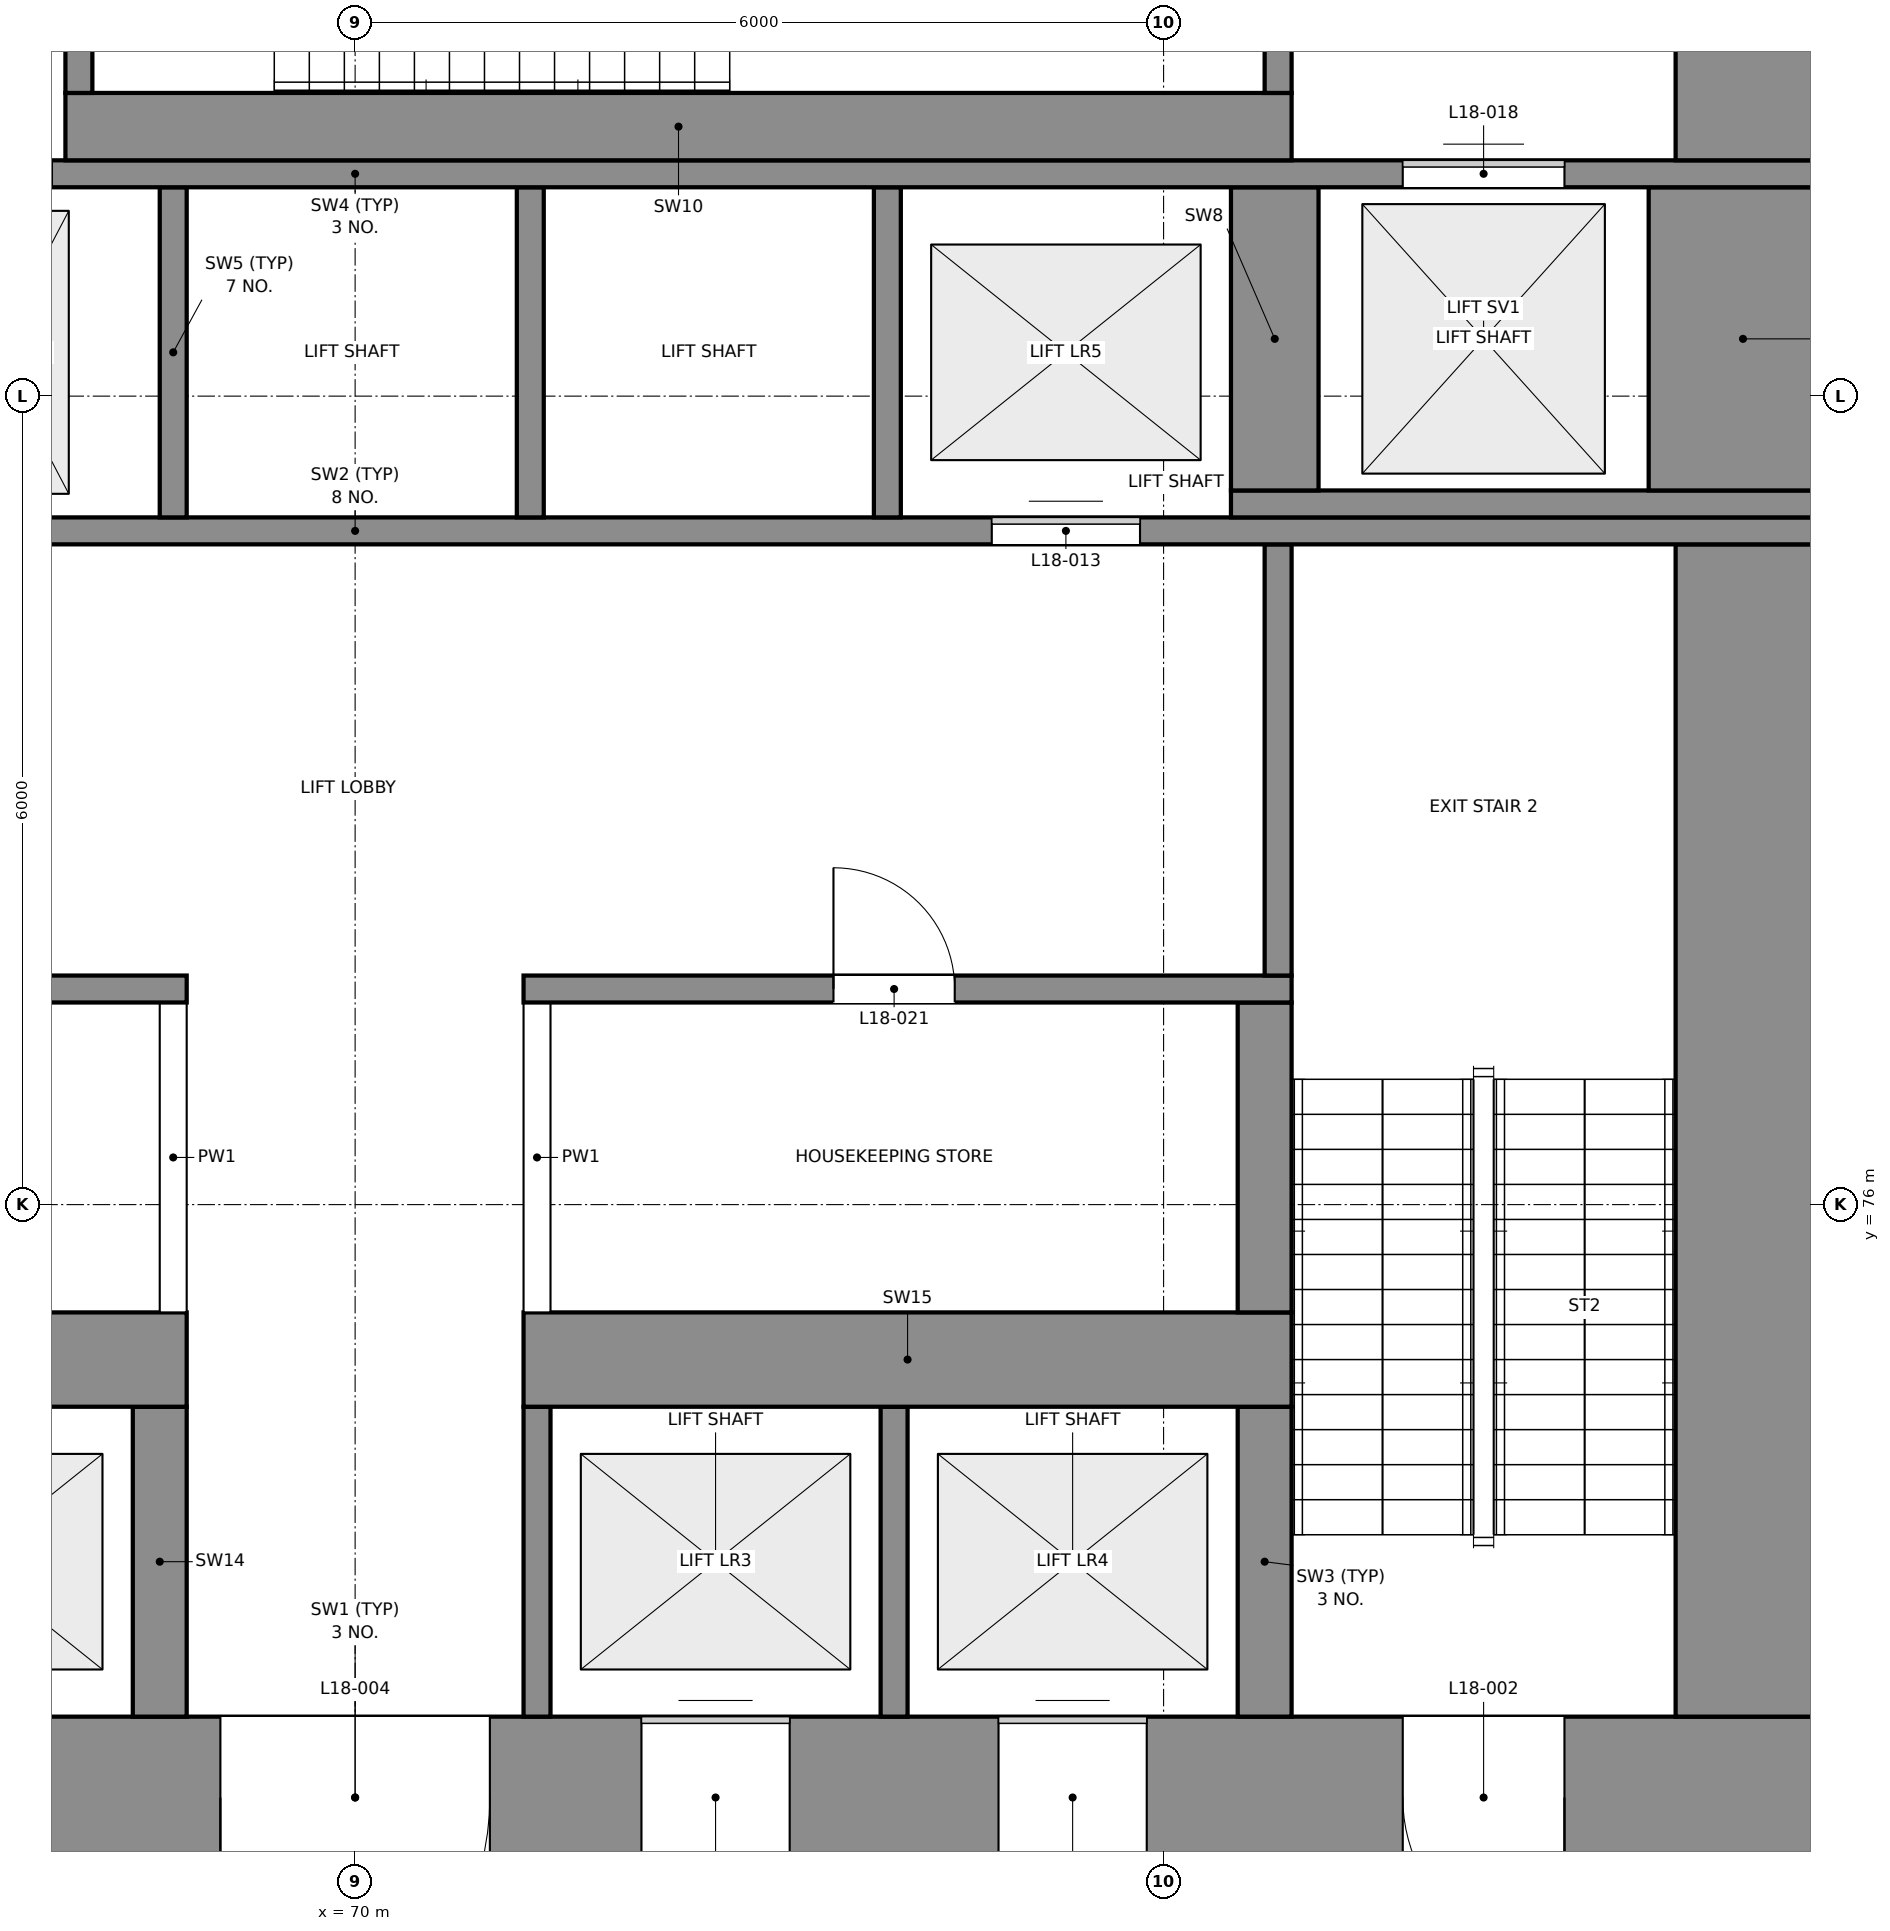
"""IFC4 building model, lengths in metres.
Left out: names, types, materials, properties, quantities, classifications, styles, units other than length and angle.
Written with IfcOpenShell. Run it as: python <this file> out.ifc"""

import sys

from ifc_helpers import new_model, si_unit, direction, frame, frame_2d, origin, place, context, subcontext, project, spatial, rectangle, extrude, element, fill, save


model = new_model("IFC4")
c1 = context("Model", 3, precision=1e-05, world=origin(), true_north=direction((0.0, 1.0)))
c2 = subcontext(c1, "Body", "Model", "MODEL_VIEW")
j1 = project(units=[si_unit("LENGTHUNIT", "METRE"), si_unit("PLANEANGLEUNIT", "RADIAN")], contexts=[c1])
p1 = place(None, origin())
s1 = spatial("IfcSite", under=j1, at=p1, CompositionType="ELEMENT")
p2 = place(p1, origin())
s2 = spatial("IfcBuilding", under=s1, at=p2, CompositionType="ELEMENT")
p3 = place(p2, frame((0.0, 0.0, 85.8)))
s3 = spatial("IfcBuildingStorey", under=s2, at=p3, CompositionType="ELEMENT", Elevation=85.8)
p4 = place(p3, frame((59.0, 71.6, 0.0), z_axis=(0.0, 0.0, 1.0), x_axis=(1.0, 0.0, 0.0)))
e1 = element("IfcWall", 1, at=p4, inside=s3, PredefinedType="SHEAR", context=c2, shape_type="SweptSolid", body=[
    extrude(rectangle(XDim=22.0, YDim=1.2, at=frame_2d((11.0, 0.0))), origin(), (0.0, 0.0, 1.0), 5.0),
])
p5 = place(p4, frame((2.025, 0.0, 0.0)))
e2 = element("IfcOpeningElement", 2, at=p5, cuts=e1, PredefinedType="OPENING", context=c2, shape_type="SweptSolid", body=[
    extrude(rectangle(XDim=1.2, YDim=2.1, at=frame_2d((0.6, 1.05))), frame((0.0, 0.61, 0.0), z_axis=(0.0, -1.0, 0.0), x_axis=(1.0, 0.0, 0.0)), (0.0, 0.0, 1.0), 1.22),
])
p6 = place(p4, frame((18.775, 0.0, 0.0)))
e3 = element("IfcOpeningElement", 3, at=p6, cuts=e1, PredefinedType="OPENING", context=c2, shape_type="SweptSolid", body=[
    extrude(rectangle(XDim=1.2, YDim=2.1, at=frame_2d((0.6, 1.05))), frame((0.0, 0.61, 0.0), z_axis=(0.0, -1.0, 0.0), x_axis=(1.0, 0.0, 0.0)), (0.0, 0.0, 1.0), 1.22),
])
p7 = place(p4, frame((10.0, 0.0, 0.0)))
e4 = element("IfcOpeningElement", 4, at=p7, cuts=e1, PredefinedType="OPENING", context=c2, shape_type="SweptSolid", body=[
    extrude(rectangle(XDim=2.0, YDim=2.1, at=frame_2d((1.0, 1.05))), frame((0.0, 0.61, 0.0), z_axis=(0.0, -1.0, 0.0), x_axis=(1.0, 0.0, 0.0)), (0.0, 0.0, 1.0), 1.22),
])
p8 = place(p4, frame((4.925, 0.0, 0.0)))
e5 = element("IfcOpeningElement", 5, at=p8, cuts=e1, PredefinedType="OPENING", context=c2, shape_type="SweptSolid", body=[
    extrude(rectangle(XDim=1.1, YDim=2.1, at=frame_2d((0.55, 1.05))), frame((0.0, 0.61, 0.0), z_axis=(0.0, -1.0, 0.0), x_axis=(1.0, 0.0, 0.0)), (0.0, 0.0, 1.0), 1.22),
])
p9 = place(p4, frame((7.575, 0.0, 0.0)))
e6 = element("IfcOpeningElement", 6, at=p9, cuts=e1, PredefinedType="OPENING", context=c2, shape_type="SweptSolid", body=[
    extrude(rectangle(XDim=1.1, YDim=2.1, at=frame_2d((0.55, 1.05))), frame((0.0, 0.61, 0.0), z_axis=(0.0, -1.0, 0.0), x_axis=(1.0, 0.0, 0.0)), (0.0, 0.0, 1.0), 1.22),
])
p10 = place(p4, frame((13.125, 0.0, 0.0)))
e7 = element("IfcOpeningElement", 7, at=p10, cuts=e1, PredefinedType="OPENING", context=c2, shape_type="SweptSolid", body=[
    extrude(rectangle(XDim=1.1, YDim=2.1, at=frame_2d((0.55, 1.05))), frame((0.0, 0.61, 0.0), z_axis=(0.0, -1.0, 0.0), x_axis=(1.0, 0.0, 0.0)), (0.0, 0.0, 1.0), 1.22),
])
p11 = place(p4, frame((15.775, 0.0, 0.0)))
e8 = element("IfcOpeningElement", 8, at=p11, cuts=e1, PredefinedType="OPENING", context=c2, shape_type="SweptSolid", body=[
    extrude(rectangle(XDim=1.1, YDim=2.1, at=frame_2d((0.55, 1.05))), frame((0.0, 0.61, 0.0), z_axis=(0.0, -1.0, 0.0), x_axis=(1.0, 0.0, 0.0)), (0.0, 0.0, 1.0), 1.22),
])
p12 = place(p3, frame((68.55, 72.2, 0.0), z_axis=(0.0, 0.0, 1.0), x_axis=(0.0, 1.0, 0.0)))
e9 = element("IfcWall", 9, at=p12, inside=s3, PredefinedType="SHEAR", context=c2, shape_type="SweptSolid", body=[
    extrude(rectangle(XDim=2.3, YDim=0.4, at=frame_2d((1.15, 0.0))), origin(), (0.0, 0.0, 1.0), 5.0),
])
for number, where, z_axis, x_axis in (
    (10, (71.35, 72.2, 0.0), (0.0, 0.0, 1.0), (0.0, 1.0, 0.0)),
    (11, (74.0, 72.2, 0.0), (0.0, 0.0, 1.0), (0.0, 1.0, 0.0)),
):
    element("IfcWall", number, at=place(p3, frame(where, z_axis=z_axis, x_axis=x_axis)), inside=s3, PredefinedType="SHEAR", context=c2, shape_type="SweptSolid", body=[
        extrude(rectangle(XDim=2.3, YDim=0.2, at=frame_2d((1.15, 0.0))), origin(), (0.0, 0.0, 1.0), 5.0),
    ])
p13 = place(p3, frame((76.75, 72.2, 0.0), z_axis=(0.0, 0.0, 1.0), x_axis=(0.0, 1.0, 0.0)))
e12 = element("IfcWall", 12, at=p13, inside=s3, PredefinedType="SHEAR", context=c2, shape_type="SweptSolid", body=[
    extrude(rectangle(XDim=2.3, YDim=0.4, at=frame_2d((1.15, 0.0))), origin(), (0.0, 0.0, 1.0), 5.0),
])
p14 = place(p3, frame((80.4, 72.2, 0.0), z_axis=(0.0, 0.0, 1.0), x_axis=(0.0, 1.0, 0.0)))
e13 = element("IfcWall", 13, at=p14, inside=s3, PredefinedType="SHEAR", context=c2, shape_type="SweptSolid", body=[
    extrude(rectangle(XDim=8.7, YDim=1.2, at=frame_2d((4.35, 0.0))), origin(), (0.0, 0.0, 1.0), 5.0),
])
for number, where, z_axis, x_axis in (
    (14, (63.05, 74.85, 0.0), (0.0, 0.0, 1.0), (1.0, 0.0, 0.0)),
    (15, (71.25, 74.85, 0.0), (0.0, 0.0, 1.0), (1.0, 0.0, 0.0)),
):
    element("IfcWall", number, at=place(p3, frame(where, z_axis=z_axis, x_axis=x_axis)), inside=s3, PredefinedType="SHEAR", context=c2, shape_type="SweptSolid", body=[
        extrude(rectangle(XDim=5.7, YDim=0.7, at=frame_2d((2.85, 0.0))), origin(), (0.0, 0.0, 1.0), 5.0),
    ])
for number, where, z_axis, x_axis in (
    (16, (68.65, 75.2, 0.0), (0.0, 0.0, 1.0), (0.0, 1.0, 0.0)),
    (17, (71.35, 75.2, 0.0), (0.0, 0.0, 1.0), (0.0, 1.0, 0.0)),
):
    element("IfcWall", number, at=place(p3, frame(where, z_axis=z_axis, x_axis=x_axis)), inside=s3, PredefinedType="PARTITIONING", context=c2, shape_type="SweptSolid", body=[
        extrude(rectangle(XDim=2.3, YDim=0.2, at=frame_2d((1.15, 0.0))), origin(), (0.0, 0.0, 1.0), 4.7),
    ])
p15 = place(p3, frame((76.75, 75.2, 0.0), z_axis=(0.0, 0.0, 1.0), x_axis=(0.0, 1.0, 0.0)))
e18 = element("IfcWall", 18, at=p15, inside=s3, PredefinedType="SHEAR", context=c2, shape_type="SweptSolid", body=[
    extrude(rectangle(XDim=2.3, YDim=0.4, at=frame_2d((1.15, 0.0))), origin(), (0.0, 0.0, 1.0), 5.0),
])
p16 = place(p3, frame((63.05, 77.6, 0.0), z_axis=(0.0, 0.0, 1.0), x_axis=(1.0, 0.0, 0.0)))
e19 = element("IfcWall", 19, at=p16, inside=s3, PredefinedType="SHEAR", context=c2, shape_type="SweptSolid", body=[
    extrude(rectangle(XDim=5.7, YDim=0.2, at=frame_2d((2.85, 0.0))), origin(), (0.0, 0.0, 1.0), 5.0),
])
p17 = place(p16, frame((2.5, 0.0, 0.0)))
e20 = element("IfcOpeningElement", 20, at=p17, cuts=e19, PredefinedType="OPENING", context=c2, shape_type="SweptSolid", body=[
    extrude(rectangle(XDim=0.9, YDim=2.1, at=frame_2d((0.45, 1.05))), frame((0.0, 0.11, 0.0), z_axis=(0.0, -1.0, 0.0), x_axis=(1.0, 0.0, 0.0)), (0.0, 0.0, 1.0), 0.22),
])
p18 = place(p3, frame((71.25, 77.6, 0.0), z_axis=(0.0, 0.0, 1.0), x_axis=(1.0, 0.0, 0.0)))
e21 = element("IfcWall", 21, at=p18, inside=s3, PredefinedType="SHEAR", context=c2, shape_type="SweptSolid", body=[
    extrude(rectangle(XDim=5.7, YDim=0.2, at=frame_2d((2.85, 0.0))), origin(), (0.0, 0.0, 1.0), 5.0),
])
p19 = place(p18, frame((2.3, 0.0, 0.0)))
e22 = element("IfcOpeningElement", 22, at=p19, cuts=e21, PredefinedType="OPENING", context=c2, shape_type="SweptSolid", body=[
    extrude(rectangle(XDim=0.9, YDim=2.1, at=frame_2d((0.45, 1.05))), frame((0.0, 0.11, 0.0), z_axis=(0.0, -1.0, 0.0), x_axis=(1.0, 0.0, 0.0)), (0.0, 0.0, 1.0), 0.22),
])
p20 = place(p3, frame((76.85, 77.7, 0.0), z_axis=(0.0, 0.0, 1.0), x_axis=(0.0, 1.0, 0.0)))
e23 = element("IfcWall", 23, at=p20, inside=s3, PredefinedType="SHEAR", context=c2, shape_type="SweptSolid", body=[
    extrude(rectangle(XDim=3.2, YDim=0.2, at=frame_2d((1.6, 0.0))), origin(), (0.0, 0.0, 1.0), 5.0),
])
p21 = place(p3, frame((59.0, 81.0, 0.0), z_axis=(0.0, 0.0, 1.0), x_axis=(1.0, 0.0, 0.0)))
e24 = element("IfcWall", 24, at=p21, inside=s3, PredefinedType="SHEAR", context=c2, shape_type="SweptSolid", body=[
    extrude(rectangle(XDim=22.0, YDim=0.2, at=frame_2d((11.0, 0.0))), origin(), (0.0, 0.0, 1.0), 5.0),
])
p22 = place(p21, frame((15.725, 0.0, 0.0)))
e25 = element("IfcOpeningElement", 25, at=p22, cuts=e24, PredefinedType="OPENING", context=c2, shape_type="SweptSolid", body=[
    extrude(rectangle(XDim=1.1, YDim=2.1, at=frame_2d((0.55, 1.05))), frame((0.0, 0.11, 0.0), z_axis=(0.0, -1.0, 0.0), x_axis=(1.0, 0.0, 0.0)), (0.0, 0.0, 1.0), 0.22),
])
for number, where, z_axis, x_axis in (
    (26, (68.65, 81.1, 0.0), (0.0, 0.0, 1.0), (0.0, 1.0, 0.0)),
    (27, (71.3, 81.1, 0.0), (0.0, 0.0, 1.0), (0.0, 1.0, 0.0)),
    (28, (73.95, 81.1, 0.0), (0.0, 0.0, 1.0), (0.0, 1.0, 0.0)),
):
    element("IfcWall", number, at=place(p3, frame(where, z_axis=z_axis, x_axis=x_axis)), inside=s3, PredefinedType="SHEAR", context=c2, shape_type="SweptSolid", body=[
        extrude(rectangle(XDim=2.45, YDim=0.2, at=frame_2d((1.225, 0.0))), origin(), (0.0, 0.0, 1.0), 5.0),
    ])
p23 = place(p3, frame((76.5, 81.2, 0.0), z_axis=(0.0, 0.0, 1.0), x_axis=(1.0, 0.0, 0.0)))
e29 = element("IfcWall", 29, at=p23, inside=s3, PredefinedType="SHEAR", context=c2, shape_type="SweptSolid", body=[
    extrude(rectangle(XDim=4.5, YDim=0.2, at=frame_2d((2.25, 0.0))), origin(), (0.0, 0.0, 1.0), 5.0),
])
p24 = place(p3, frame((76.825, 81.3, 0.0), z_axis=(0.0, 0.0, 1.0), x_axis=(0.0, 1.0, 0.0)))
e30 = element("IfcWall", 30, at=p24, inside=s3, PredefinedType="SHEAR", context=c2, shape_type="SweptSolid", body=[
    extrude(rectangle(XDim=2.25, YDim=0.65, at=frame_2d((1.125, 0.0))), origin(), (0.0, 0.0, 1.0), 5.0),
])
p25 = place(p3, frame((80.3, 81.3, 0.0), z_axis=(0.0, 0.0, 1.0), x_axis=(0.0, 1.0, 0.0)))
e31 = element("IfcWall", 31, at=p25, inside=s3, PredefinedType="SHEAR", context=c2, shape_type="SweptSolid", body=[
    extrude(rectangle(XDim=2.25, YDim=1.4, at=frame_2d((1.125, 0.0))), origin(), (0.0, 0.0, 1.0), 5.0),
])
p26 = place(p3, frame((59.0, 83.65, 0.0), z_axis=(0.0, 0.0, 1.0), x_axis=(1.0, 0.0, 0.0)))
e32 = element("IfcWall", 32, at=p26, inside=s3, PredefinedType="SHEAR", context=c2, shape_type="SweptSolid", body=[
    extrude(rectangle(XDim=22.0, YDim=0.2, at=frame_2d((11.0, 0.0))), origin(), (0.0, 0.0, 1.0), 5.0),
])
p27 = place(p26, frame((5.125, 0.0, 0.0)))
e33 = element("IfcOpeningElement", 33, at=p27, cuts=e32, PredefinedType="OPENING", context=c2, shape_type="SweptSolid", body=[
    extrude(rectangle(XDim=1.1, YDim=2.1, at=frame_2d((0.55, 1.05))), frame((0.0, 0.11, 0.0), z_axis=(0.0, -1.0, 0.0), x_axis=(1.0, 0.0, 0.0)), (0.0, 0.0, 1.0), 0.22),
])
p28 = place(p26, frame((7.65, 0.0, 0.0)))
e34 = element("IfcOpeningElement", 34, at=p28, cuts=e32, PredefinedType="OPENING", context=c2, shape_type="SweptSolid", body=[
    extrude(rectangle(XDim=1.1, YDim=2.1, at=frame_2d((0.55, 1.05))), frame((0.0, 0.11, 0.0), z_axis=(0.0, -1.0, 0.0), x_axis=(1.0, 0.0, 0.0)), (0.0, 0.0, 1.0), 0.22),
])
p29 = place(p26, frame((18.775, 0.0, 0.0)))
e35 = element("IfcOpeningElement", 35, at=p29, cuts=e32, PredefinedType="OPENING", context=c2, shape_type="SweptSolid", body=[
    extrude(rectangle(XDim=1.2, YDim=2.1, at=frame_2d((0.6, 1.05))), frame((0.0, 0.11, 0.0), z_axis=(0.0, -1.0, 0.0), x_axis=(1.0, 0.0, 0.0)), (0.0, 0.0, 1.0), 0.22),
])
p30 = place(p26, frame((2.075, 0.0, 0.0)))
e36 = element("IfcOpeningElement", 36, at=p30, cuts=e32, PredefinedType="OPENING", context=c2, shape_type="SweptSolid", body=[
    extrude(rectangle(XDim=1.1, YDim=2.1, at=frame_2d((0.55, 1.05))), frame((0.0, 0.11, 0.0), z_axis=(0.0, -1.0, 0.0), x_axis=(1.0, 0.0, 0.0)), (0.0, 0.0, 1.0), 0.22),
])
p31 = place(p3, frame((67.85, 84.0, 0.0), z_axis=(0.0, 0.0, 1.0), x_axis=(1.0, 0.0, 0.0)))
e37 = element("IfcWall", 37, at=p31, inside=s3, PredefinedType="SHEAR", context=c2, shape_type="SweptSolid", body=[
    extrude(rectangle(XDim=9.1, YDim=0.5, at=frame_2d((4.55, 0.0))), origin(), (0.0, 0.0, 1.0), 5.0),
])
p32 = place(p3, frame((80.4, 83.75, 0.0), z_axis=(0.0, 0.0, 1.0), x_axis=(0.0, 1.0, 0.0)))
e38 = element("IfcWall", 38, at=p32, inside=s3, PredefinedType="SHEAR", context=c2, shape_type="SweptSolid", body=[
    extrude(rectangle(XDim=3.05, YDim=1.2, at=frame_2d((1.525, 0.0))), origin(), (0.0, 0.0, 1.0), 5.0),
])
p33 = place(p32, frame((0.925, 0.0, 0.0)))
e39 = element("IfcOpeningElement", 39, at=p33, cuts=e38, PredefinedType="OPENING", context=c2, shape_type="SweptSolid", body=[
    extrude(rectangle(XDim=1.2, YDim=2.1, at=frame_2d((0.6, 1.05))), frame((0.0, 0.61, 0.0), z_axis=(0.0, -1.0, 0.0), x_axis=(1.0, 0.0, 0.0)), (0.0, 0.0, 1.0), 1.22),
])
p34 = place(p3, frame((67.95, 84.25, 0.0), z_axis=(0.0, 0.0, 1.0), x_axis=(0.0, 1.0, 0.0)))
e40 = element("IfcWall", 40, at=p34, inside=s3, PredefinedType="SHEAR", context=c2, shape_type="SweptSolid", body=[
    extrude(rectangle(XDim=2.55, YDim=0.2, at=frame_2d((1.275, 0.0))), origin(), (0.0, 0.0, 1.0), 5.0),
])
p35 = place(p34, frame((0.825, 0.0, 0.0)))
e41 = element("IfcOpeningElement", 41, at=p35, cuts=e40, PredefinedType="OPENING", context=c2, shape_type="SweptSolid", body=[
    extrude(rectangle(XDim=1.2, YDim=2.1, at=frame_2d((0.6, 1.05))), frame((0.0, 0.11, 0.0), z_axis=(0.0, -1.0, 0.0), x_axis=(1.0, 0.0, 0.0)), (0.0, 0.0, 1.0), 0.22),
])
p36 = place(p3, frame((76.85, 84.25, 0.0), z_axis=(0.0, 0.0, 1.0), x_axis=(0.0, 1.0, 0.0)))
e42 = element("IfcWall", 42, at=p36, inside=s3, PredefinedType="SHEAR", context=c2, shape_type="SweptSolid", body=[
    extrude(rectangle(XDim=2.55, YDim=0.2, at=frame_2d((1.275, 0.0))), origin(), (0.0, 0.0, 1.0), 5.0),
])
p37 = place(p6, frame((1.2, 0.0, 0.0), z_axis=(0.0, 0.0, 1.0), x_axis=(-1.0, 0.0, 0.0)))
e43 = element("IfcDoor", 43, at=p37, inside=s3, OperationType="SINGLE_SWING_LEFT", PredefinedType="DOOR", context=c2, shape_type="SweptSolid", body=[
    extrude(rectangle(XDim=1.2, YDim=2.1, at=frame_2d((0.6, 1.05))), frame((0.0, 0.025, 0.0), z_axis=(0.0, -1.0, 0.0), x_axis=(1.0, 0.0, 0.0)), (0.0, 0.0, 1.0), 0.05),
])
fill(e3, e43)
p38 = place(p7, frame((2.0, 0.0, 0.0), z_axis=(0.0, 0.0, 1.0), x_axis=(-1.0, 0.0, 0.0)))
e44 = element("IfcDoor", 44, at=p38, inside=s3, OperationType="DOUBLE_DOOR_SINGLE_SWING", PredefinedType="DOOR", context=c2, shape_type="SweptSolid", body=[
    extrude(rectangle(XDim=2.0, YDim=2.1, at=frame_2d((1.0, 1.05))), frame((0.0, 0.025, 0.0), z_axis=(0.0, -1.0, 0.0), x_axis=(1.0, 0.0, 0.0)), (0.0, 0.0, 1.0), 0.05),
])
fill(e4, e44)
p39 = place(p22, origin())
e45 = element("IfcDoor", 45, at=p39, inside=s3, OperationType="DOUBLE_DOOR_SLIDING", PredefinedType="DOOR", context=c2, shape_type="SweptSolid", body=[
    extrude(rectangle(XDim=1.1, YDim=2.1, at=frame_2d((0.55, 1.05))), frame((0.0, 0.025, 0.0), z_axis=(0.0, -1.0, 0.0), x_axis=(1.0, 0.0, 0.0)), (0.0, 0.0, 1.0), 0.05),
])
fill(e25, e45)
p40 = place(p10, origin())
e46 = element("IfcDoor", 46, at=p40, inside=s3, OperationType="DOUBLE_DOOR_SLIDING", PredefinedType="DOOR", context=c2, shape_type="SweptSolid", body=[
    extrude(rectangle(XDim=1.1, YDim=2.1, at=frame_2d((0.55, 1.05))), frame((0.0, 0.025, 0.0), z_axis=(0.0, -1.0, 0.0), x_axis=(1.0, 0.0, 0.0)), (0.0, 0.0, 1.0), 0.05),
])
fill(e7, e46)
p41 = place(p11, origin())
e47 = element("IfcDoor", 47, at=p41, inside=s3, OperationType="DOUBLE_DOOR_SLIDING", PredefinedType="DOOR", context=c2, shape_type="SweptSolid", body=[
    extrude(rectangle(XDim=1.1, YDim=2.1, at=frame_2d((0.55, 1.05))), frame((0.0, 0.025, 0.0), z_axis=(0.0, -1.0, 0.0), x_axis=(1.0, 0.0, 0.0)), (0.0, 0.0, 1.0), 0.05),
])
fill(e8, e47)
p42 = place(p29, origin())
e48 = element("IfcDoor", 48, at=p42, inside=s3, OperationType="DOUBLE_DOOR_SLIDING", PredefinedType="DOOR", context=c2, shape_type="SweptSolid", body=[
    extrude(rectangle(XDim=1.2, YDim=2.1, at=frame_2d((0.6, 1.05))), frame((0.0, 0.025, 0.0), z_axis=(0.0, -1.0, 0.0), x_axis=(1.0, 0.0, 0.0)), (0.0, 0.0, 1.0), 0.05),
])
fill(e35, e48)
p43 = place(p19, origin())
e49 = element("IfcDoor", 49, at=p43, inside=s3, OperationType="SINGLE_SWING_LEFT", PredefinedType="DOOR", context=c2, shape_type="SweptSolid", body=[
    extrude(rectangle(XDim=0.9, YDim=2.1, at=frame_2d((0.45, 1.05))), frame((0.0, 0.025, 0.0), z_axis=(0.0, -1.0, 0.0), x_axis=(1.0, 0.0, 0.0)), (0.0, 0.0, 1.0), 0.05),
])
fill(e22, e49)
save(model, sys.argv[1])
